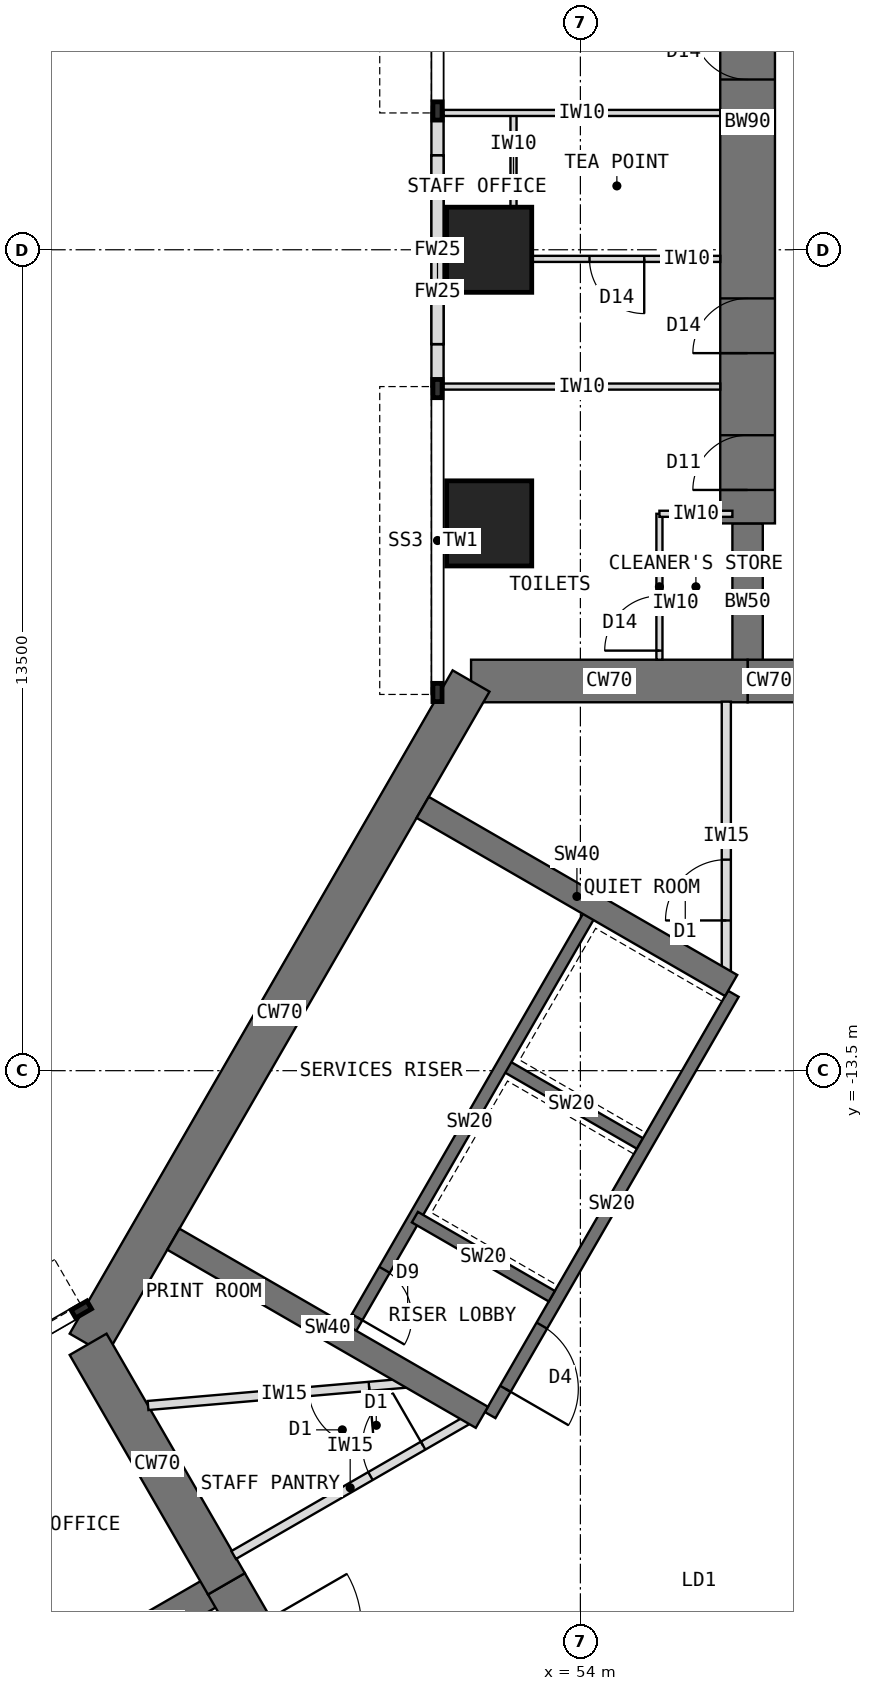
"""IFC4 building model, lengths in metres.
Left out: names, types, materials, properties, quantities, classifications, styles, units other than length and angle.
Written with IfcOpenShell. Run it as: python <this file> out.ifc"""

import sys

from ifc_helpers import new_model, si_unit, direction, frame, frame_2d, origin, origin_2d, place, context, subcontext, project, spatial, rectangle, extrude, element, fill, save


model = new_model("IFC4")
c1 = context("Model", 3, precision=1e-05, world=origin(), true_north=direction((0.0, 1.0)))
c2 = subcontext(c1, "Body", "Model", "MODEL_VIEW")
j1 = project(units=[si_unit("LENGTHUNIT", "METRE"), si_unit("PLANEANGLEUNIT", "RADIAN")], contexts=[c1])
p1 = place(None, origin())
s1 = spatial("IfcSite", under=j1, at=p1, CompositionType="ELEMENT")
p2 = place(p1, origin())
s2 = spatial("IfcBuilding", under=s1, at=p2, CompositionType="ELEMENT")
p3 = place(p2, frame((0.0, 0.0, 88.5)))
s3 = spatial("IfcBuildingStorey", under=s2, at=p3, CompositionType="ELEMENT", Elevation=88.5)
p4 = place(p3, frame((60.25, -7.092, 0.0), z_axis=(0.0, 0.0, 1.0), x_axis=(-1.0, 0.0, 0.0)))
e1 = element("IfcWall", 1, at=p4, inside=s3, PredefinedType="SHEAR", context=c2, shape_type="SweptSolid", body=[
    extrude(rectangle(XDim=3.5, YDim=0.7, at=frame_2d((1.75, 0.0))), origin(), (0.0, 0.0, 1.0), 4.0),
])
p5 = place(p4, frame((0.85, 0.0, 0.0)))
e2 = element("IfcOpeningElement", 2, at=p5, cuts=e1, PredefinedType="OPENING", context=c2, shape_type="SweptSolid", body=[
    extrude(rectangle(XDim=1.8, YDim=2.1, at=frame_2d((0.9, 1.05))), frame((0.0, 0.36, 0.0), z_axis=(0.0, -1.0, 0.0), x_axis=(1.0, 0.0, 0.0)), (0.0, 0.0, 1.0), 0.72),
])
p6 = place(p3, frame((56.75, -7.092, 0.0), z_axis=(0.0, 0.0, 1.0), x_axis=(-1.0, 0.0, 0.0)))
e3 = element("IfcWall", 3, at=p6, inside=s3, PredefinedType="SHEAR", context=c2, shape_type="SweptSolid", body=[
    extrude(rectangle(XDim=4.548, YDim=0.7, at=frame_2d((2.274, 0.0))), origin(), (0.0, 0.0, 1.0), 4.0),
])
p7 = place(p3, frame((52.202, -7.092, 0.0), z_axis=(0.0, 0.0, 1.0), x_axis=(-0.500005998175, -0.866021940709, 0.0)))
e4 = element("IfcWall", 4, at=p7, inside=s3, PredefinedType="SHEAR", context=c2, shape_type="SweptSolid", body=[
    extrude(rectangle(XDim=12.596, YDim=0.7, at=frame_2d((6.298, 0.0))), origin(), (0.0, 0.0, 1.0), 4.0),
])
p8 = place(p3, frame((45.904, -18.0, 0.0), z_axis=(0.0, 0.0, 1.0), x_axis=(0.500024481964, -0.866011268655, 0.0)))
e5 = element("IfcWall", 5, at=p8, inside=s3, PredefinedType="SHEAR", context=c2, shape_type="SweptSolid", body=[
    extrude(rectangle(XDim=4.548, YDim=0.7, at=frame_2d((2.274, 0.0))), origin(), (0.0, 0.0, 1.0), 4.0),
])
p9 = place(p3, frame((48.178, -21.939, 0.0), z_axis=(0.0, 0.0, 1.0), x_axis=(0.500010275428, -0.866019471182, 0.0)))
e6 = element("IfcWall", 6, at=p9, inside=s3, PredefinedType="SHEAR", context=c2, shape_type="SweptSolid", body=[
    extrude(rectangle(XDim=3.5, YDim=0.7, at=frame_2d((1.75, 0.0))), origin(), (0.0, 0.0, 1.0), 4.0),
])
p10 = place(p9, frame((0.85, 0.0, 0.0)))
e7 = element("IfcOpeningElement", 7, at=p10, cuts=e6, PredefinedType="OPENING", context=c2, shape_type="SweptSolid", body=[
    extrude(rectangle(XDim=1.8, YDim=2.1, at=frame_2d((0.9, 1.05))), frame((0.0, 0.36, 0.0), z_axis=(0.0, -1.0, 0.0), x_axis=(1.0, 0.0, 0.0)), (0.0, 0.0, 1.0), 0.72),
])
p11 = place(p3, frame((56.75, -7.092, 0.0), z_axis=(0.0, 0.0, 1.0), x_axis=(0.0, 1.0, 0.0)))
e8 = element("IfcWall", 8, at=p11, inside=s3, PredefinedType="SHEAR", context=c2, shape_type="SweptSolid", body=[
    extrude(rectangle(XDim=2.592, YDim=0.5, at=frame_2d((1.296, 0.0))), origin(), (0.0, 0.0, 1.0), 4.0),
])
p12 = place(p3, frame((56.75, -4.5, 0.0), z_axis=(0.0, 0.0, 1.0), x_axis=(0.0, 1.0, 0.0)))
e9 = element("IfcWall", 9, at=p12, inside=s3, PredefinedType="SHEAR", context=c2, shape_type="SweptSolid", body=[
    extrude(rectangle(XDim=13.2, YDim=0.9, at=frame_2d((6.6, 0.0))), origin(), (0.0, 0.0, 1.0), 4.0),
])
p13 = place(p12, frame((0.55, 0.0, 0.0)))
e10 = element("IfcOpeningElement", 10, at=p13, cuts=e9, PredefinedType="OPENING", context=c2, shape_type="SweptSolid", body=[
    extrude(rectangle(XDim=0.9, YDim=2.1, at=frame_2d((0.45, 1.05))), frame((0.0, 0.46, 0.0), z_axis=(0.0, -1.0, 0.0), x_axis=(1.0, 0.0, 0.0)), (0.0, 0.0, 1.0), 0.92),
])
p14 = place(p12, frame((2.8, 0.0, 0.0)))
e11 = element("IfcOpeningElement", 11, at=p14, cuts=e9, PredefinedType="OPENING", context=c2, shape_type="SweptSolid", body=[
    extrude(rectangle(XDim=0.9, YDim=2.1, at=frame_2d((0.45, 1.05))), frame((0.0, 0.46, 0.0), z_axis=(0.0, -1.0, 0.0), x_axis=(1.0, 0.0, 0.0)), (0.0, 0.0, 1.0), 0.92),
])
p15 = place(p12, frame((7.3, 0.0, 0.0)))
e12 = element("IfcOpeningElement", 12, at=p15, cuts=e9, PredefinedType="OPENING", context=c2, shape_type="SweptSolid", body=[
    extrude(rectangle(XDim=0.9, YDim=2.1, at=frame_2d((0.45, 1.05))), frame((0.0, 0.46, 0.0), z_axis=(0.0, -1.0, 0.0), x_axis=(1.0, 0.0, 0.0)), (0.0, 0.0, 1.0), 0.92),
])
p16 = place(p3, frame((48.178, -21.939, 0.0), z_axis=(0.0, 0.0, 1.0), x_axis=(-0.866072649678, -0.499918158782, 0.0)))
e13 = element("IfcWall", 13, at=p16, inside=s3, PredefinedType="SHEAR", context=c2, shape_type="SweptSolid", body=[
    extrude(rectangle(XDim=2.592, YDim=0.5, at=frame_2d((1.296, 0.0))), origin(), (0.0, 0.0, 1.0), 4.0),
])
for number, where, z_axis, x_axis in (
    (14, (52.5, -4.5, 0.0), (0.0, 0.0, 1.0), (1.0, 0.0, 0.0)),
    (15, (52.5, 0.0, 0.0), (0.0, 0.0, 1.0), (1.0, 0.0, 0.0)),
):
    element("IfcColumn", number, at=place(p3, frame(where, z_axis=z_axis, x_axis=x_axis)), inside=s3, PredefinedType="COLUMN", context=c2, shape_type="SweptSolid", body=[
        extrude(rectangle(XDim=1.4, YDim=1.4, at=origin_2d()), origin(), (0.0, 0.0, 1.0), 4.0),
    ])
for number, where, z_axis, x_axis in (
    (16, (51.65, -2.25, 0.0), (0.0, 0.0, 1.0), (0.0, 1.0, 0.0)),
    (17, (51.65, 1.551, 0.0), (0.0, 0.0, 1.0), (0.0, 1.0, 0.0)),
):
    element("IfcWall", number, at=place(p3, frame(where, z_axis=z_axis, x_axis=x_axis)), inside=s3, PredefinedType="STANDARD", context=c2, shape_type="SweptSolid", body=[
        extrude(rectangle(XDim=0.699, YDim=0.2, at=frame_2d((0.35, 0.0))), origin(), (0.0, 0.0, 1.0), 4.0),
    ])
p17 = place(p3, frame((51.65, -1.551, 0.0), z_axis=(0.0, 0.0, 1.0), x_axis=(0.0, 1.0, 0.0)))
e18 = element("IfcWall", 18, at=p17, inside=s3, PredefinedType="STANDARD", context=c2, shape_type="SweptSolid", body=[
    extrude(rectangle(XDim=3.102, YDim=0.2, at=frame_2d((1.551, 0.0))), origin(), (0.0, 0.0, 1.0), 1.611),
])
p18 = place(p3, frame((51.65, -1.551, 2.821), z_axis=(0.0, 0.0, 1.0), x_axis=(0.0, 1.0, 0.0)))
e19 = element("IfcWall", 19, at=p18, inside=s3, PredefinedType="STANDARD", context=c2, shape_type="SweptSolid", body=[
    extrude(rectangle(XDim=3.102, YDim=0.2, at=frame_2d((1.551, 0.0))), origin(), (0.0, 0.0, 1.0), 1.179),
])
p19 = place(p3, frame((56.516, -12.236, 0.0), z_axis=(0.0, 0.0, 1.0), x_axis=(-0.49999894854, -0.866026010844, 0.0)))
e20 = element("IfcWall", 20, at=p19, inside=s3, PredefinedType="SHEAR", context=c2, shape_type="SweptSolid", body=[
    extrude(rectangle(XDim=8.0, YDim=0.2, at=frame_2d((4.0, 0.0))), origin(), (0.0, 0.0, 1.0), 4.0),
])
p20 = place(p19, frame((6.3, 0.0, 0.0)))
e21 = element("IfcOpeningElement", 21, at=p20, cuts=e20, PredefinedType="OPENING", context=c2, shape_type="SweptSolid", body=[
    extrude(rectangle(XDim=1.2, YDim=2.1, at=frame_2d((0.6, 1.05))), frame((0.0, 0.11, 0.0), z_axis=(0.0, -1.0, 0.0), x_axis=(1.0, 0.0, 0.0)), (0.0, 0.0, 1.0), 0.22),
])
for number, where, z_axis, x_axis in (
    (22, (54.98, -14.697, 0.0), (0.0, 0.0, 1.0), (-0.866, 0.5, 0.0)),
    (23, (53.53, -17.209, 0.0), (0.0, 0.0, 1.0), (-0.866, 0.5, 0.0)),
):
    element("IfcWall", number, at=place(p3, frame(where, z_axis=z_axis, x_axis=x_axis)), inside=s3, PredefinedType="SHEAR", context=c2, shape_type="SweptSolid", body=[
        extrude(rectangle(XDim=2.6, YDim=0.2, at=frame_2d((1.3, 0.0))), origin(), (0.0, 0.0, 1.0), 4.0),
    ])
p21 = place(p3, frame((54.178, -10.886, 0.0), z_axis=(0.0, 0.0, 1.0), x_axis=(-0.49999894854, -0.866026010844, 0.0)))
e24 = element("IfcWall", 24, at=p21, inside=s3, PredefinedType="SHEAR", context=c2, shape_type="SweptSolid", body=[
    extrude(rectangle(XDim=8.0, YDim=0.2, at=frame_2d((4.0, 0.0))), origin(), (0.0, 0.0, 1.0), 4.0),
])
p22 = place(p21, frame((6.8, 0.0, 0.0)))
e25 = element("IfcOpeningElement", 25, at=p22, cuts=e24, PredefinedType="OPENING", context=c2, shape_type="SweptSolid", body=[
    extrude(rectangle(XDim=0.9, YDim=2.1, at=frame_2d((0.45, 1.05))), frame((0.0, 0.11, 0.0), z_axis=(0.0, -1.0, 0.0), x_axis=(1.0, 0.0, 0.0)), (0.0, 0.0, 1.0), 0.22),
])
for number, where, z_axis, x_axis in (
    (26, (52.38, -19.201, 0.0), (0.0, 0.0, 1.0), (-0.866, 0.5, 0.0)),
    (27, (56.48, -12.099, 0.0), (0.0, 0.0, 1.0), (-0.866, 0.5, 0.0)),
):
    element("IfcWall", number, at=place(p3, frame(where, z_axis=z_axis, x_axis=x_axis)), inside=s3, PredefinedType="SHEAR", context=c2, shape_type="SweptSolid", body=[
        extrude(rectangle(XDim=5.858, YDim=0.4, at=frame_2d((2.929, 0.0))), origin(), (0.0, 0.0, 1.0), 4.0),
    ])
for number, where, z_axis, x_axis in (
    (28, (56.3, -2.25, 0.0), (0.0, 0.0, 1.0), (-1.0, 0.0, 0.0)),
    (29, (56.3, 2.25, 0.0), (0.0, 0.0, 1.0), (-1.0, 0.0, 0.0)),
):
    element("IfcWall", number, at=place(p3, frame(where, z_axis=z_axis, x_axis=x_axis)), inside=s3, PredefinedType="PARTITIONING", context=c2, shape_type="SweptSolid", body=[
        extrude(rectangle(XDim=4.55, YDim=0.1, at=frame_2d((2.275, 0.0))), origin(), (0.0, 0.0, 1.0), 3.7),
    ])
p23 = place(p3, frame((52.9, -0.15, 0.0), z_axis=(0.0, 0.0, 1.0), x_axis=(0.0, 1.0, 0.0)))
e30 = element("IfcWall", 30, at=p23, inside=s3, PredefinedType="PARTITIONING", context=c2, shape_type="SweptSolid", body=[
    extrude(rectangle(XDim=2.4, YDim=0.1, at=frame_2d((1.2, 0.0))), origin(), (0.0, 0.0, 1.0), 3.7),
])
p24 = place(p3, frame((56.3, -0.15, 0.0), z_axis=(0.0, 0.0, 1.0), x_axis=(-1.0, 0.0, 0.0)))
e31 = element("IfcWall", 31, at=p24, inside=s3, PredefinedType="PARTITIONING", context=c2, shape_type="SweptSolid", body=[
    extrude(rectangle(XDim=3.4, YDim=0.1, at=frame_2d((1.7, 0.0))), origin(), (0.0, 0.0, 1.0), 3.7),
])
p25 = place(p24, frame((1.25, 0.0, 0.0)))
e32 = element("IfcOpeningElement", 32, at=p25, cuts=e31, PredefinedType="OPENING", context=c2, shape_type="SweptSolid", body=[
    extrude(rectangle(XDim=0.9, YDim=2.1, at=frame_2d((0.45, 1.05))), frame((0.0, 0.06, 0.0), z_axis=(0.0, -1.0, 0.0), x_axis=(1.0, 0.0, 0.0)), (0.0, 0.0, 1.0), 0.12),
])
p26 = place(p3, frame((55.3, -6.742, 0.0), z_axis=(0.0, 0.0, 1.0), x_axis=(0.0, 1.0, 0.0)))
e33 = element("IfcWall", 33, at=p26, inside=s3, PredefinedType="PARTITIONING", context=c2, shape_type="SweptSolid", body=[
    extrude(rectangle(XDim=2.4, YDim=0.1, at=frame_2d((1.2, 0.0))), origin(), (0.0, 0.0, 1.0), 3.7),
])
p27 = place(p26, frame((0.15, 0.0, 0.0)))
e34 = element("IfcOpeningElement", 34, at=p27, cuts=e33, PredefinedType="OPENING", context=c2, shape_type="SweptSolid", body=[
    extrude(rectangle(XDim=0.9, YDim=2.1, at=frame_2d((0.45, 1.05))), frame((0.0, 0.06, 0.0), z_axis=(0.0, -1.0, 0.0), x_axis=(1.0, 0.0, 0.0)), (0.0, 0.0, 1.0), 0.12),
])
p28 = place(p3, frame((56.5, -4.342, 0.0), z_axis=(0.0, 0.0, 1.0), x_axis=(-1.0, 0.0, 0.0)))
e35 = element("IfcWall", 35, at=p28, inside=s3, PredefinedType="PARTITIONING", context=c2, shape_type="SweptSolid", body=[
    extrude(rectangle(XDim=1.2, YDim=0.1, at=frame_2d((0.6, 0.0))), origin(), (0.0, 0.0, 1.0), 3.7),
])
p29 = place(p3, frame((48.298, -21.466, 0.0), z_axis=(0.0, 0.0, 1.0), x_axis=(0.866021148949, 0.500007369519, 0.0)))
e36 = element("IfcWall", 36, at=p29, inside=s3, PredefinedType="PARTITIONING", context=c2, shape_type="SweptSolid", body=[
    extrude(rectangle(XDim=4.426, YDim=0.15, at=frame_2d((2.213, 0.0))), origin(), (0.0, 0.0, 1.0), 3.7),
])
p30 = place(p29, frame((2.598, 0.0, 0.0)))
e37 = element("IfcOpeningElement", 37, at=p30, cuts=e36, PredefinedType="OPENING", context=c2, shape_type="SweptSolid", body=[
    extrude(rectangle(XDim=1.0, YDim=2.1, at=frame_2d((0.5, 1.05))), frame((0.0, 0.085, 0.0), z_axis=(0.0, -1.0, 0.0), x_axis=(1.0, 0.0, 0.0)), (0.0, 0.0, 1.0), 0.17),
])
p31 = place(p3, frame((56.4, -11.857, 0.0), z_axis=(0.0, 0.0, 1.0), x_axis=(0.0, 1.0, 0.0)))
e38 = element("IfcWall", 38, at=p31, inside=s3, PredefinedType="PARTITIONING", context=c2, shape_type="SweptSolid", body=[
    extrude(rectangle(XDim=4.426, YDim=0.15, at=frame_2d((2.213, 0.0))), origin(), (0.0, 0.0, 1.0), 3.7),
])
p32 = place(p31, frame((0.828, 0.0, 0.0)))
e39 = element("IfcOpeningElement", 39, at=p32, cuts=e38, PredefinedType="OPENING", context=c2, shape_type="SweptSolid", body=[
    extrude(rectangle(XDim=1.0, YDim=2.1, at=frame_2d((0.5, 1.05))), frame((0.0, 0.085, 0.0), z_axis=(0.0, -1.0, 0.0), x_axis=(1.0, 0.0, 0.0)), (0.0, 0.0, 1.0), 0.17),
])
p33 = place(p3, frame((51.371, -18.618, 0.0), z_axis=(0.0, 0.0, 1.0), x_axis=(-0.996259708579, -0.086409450071, 0.0)))
e40 = element("IfcWall", 40, at=p33, inside=s3, PredefinedType="PARTITIONING", context=c2, shape_type="SweptSolid", body=[
    extrude(rectangle(XDim=4.498, YDim=0.15, at=frame_2d((2.249, 0.0))), origin(), (0.0, 0.0, 1.0), 3.7),
])
p34 = place(p33, frame((0.849, 0.0, 0.0)))
e41 = element("IfcOpeningElement", 41, at=p34, cuts=e40, PredefinedType="OPENING", context=c2, shape_type="SweptSolid", body=[
    extrude(rectangle(XDim=1.0, YDim=2.1, at=frame_2d((0.5, 1.05))), frame((0.0, 0.085, 0.0), z_axis=(0.0, -1.0, 0.0), x_axis=(1.0, 0.0, 0.0)), (0.0, 0.0, 1.0), 0.17),
])
p35 = place(p20, origin())
e42 = element("IfcDoor", 42, at=p35, inside=s3, OperationType="SINGLE_SWING_RIGHT", PredefinedType="DOOR", context=c2, shape_type="SweptSolid", body=[
    extrude(rectangle(XDim=1.2, YDim=2.1, at=frame_2d((0.6, 1.05))), frame((0.0, 0.025, 0.0), z_axis=(0.0, -1.0, 0.0), x_axis=(1.0, 0.0, 0.0)), (0.0, 0.0, 1.0), 0.05),
])
fill(e21, e42)
p36 = place(p22, origin())
e43 = element("IfcDoor", 43, at=p36, inside=s3, OperationType="SINGLE_SWING_RIGHT", PredefinedType="DOOR", context=c2, shape_type="SweptSolid", body=[
    extrude(rectangle(XDim=0.9, YDim=2.1, at=frame_2d((0.45, 1.05))), frame((0.0, 0.025, 0.0), z_axis=(0.0, -1.0, 0.0), x_axis=(1.0, 0.0, 0.0)), (0.0, 0.0, 1.0), 0.05),
])
fill(e25, e43)
p37 = place(p25, origin())
e44 = element("IfcDoor", 44, at=p37, inside=s3, OperationType="SINGLE_SWING_LEFT", PredefinedType="DOOR", context=c2, shape_type="SweptSolid", body=[
    extrude(rectangle(XDim=0.9, YDim=2.1, at=frame_2d((0.45, 1.05))), frame((0.0, 0.025, 0.0), z_axis=(0.0, -1.0, 0.0), x_axis=(1.0, 0.0, 0.0)), (0.0, 0.0, 1.0), 0.05),
])
fill(e32, e44)
p38 = place(p27, origin())
e45 = element("IfcDoor", 45, at=p38, inside=s3, OperationType="SINGLE_SWING_LEFT", PredefinedType="DOOR", context=c2, shape_type="SweptSolid", body=[
    extrude(rectangle(XDim=0.9, YDim=2.1, at=frame_2d((0.45, 1.05))), frame((0.0, 0.025, 0.0), z_axis=(0.0, -1.0, 0.0), x_axis=(1.0, 0.0, 0.0)), (0.0, 0.0, 1.0), 0.05),
])
fill(e34, e45)
p39 = place(p34, origin())
e46 = element("IfcDoor", 46, at=p39, inside=s3, OperationType="SINGLE_SWING_LEFT", PredefinedType="DOOR", context=c2, shape_type="SweptSolid", body=[
    extrude(rectangle(XDim=1.0, YDim=2.1, at=frame_2d((0.5, 1.05))), frame((0.0, 0.025, 0.0), z_axis=(0.0, -1.0, 0.0), x_axis=(1.0, 0.0, 0.0)), (0.0, 0.0, 1.0), 0.05),
])
fill(e41, e46)
p40 = place(p30, origin())
e47 = element("IfcDoor", 47, at=p40, inside=s3, OperationType="SINGLE_SWING_RIGHT", PredefinedType="DOOR", context=c2, shape_type="SweptSolid", body=[
    extrude(rectangle(XDim=1.0, YDim=2.1, at=frame_2d((0.5, 1.05))), frame((0.0, 0.025, 0.0), z_axis=(0.0, -1.0, 0.0), x_axis=(1.0, 0.0, 0.0)), (0.0, 0.0, 1.0), 0.05),
])
fill(e37, e47)
p41 = place(p32, origin())
e48 = element("IfcDoor", 48, at=p41, inside=s3, OperationType="SINGLE_SWING_LEFT", PredefinedType="DOOR", context=c2, shape_type="SweptSolid", body=[
    extrude(rectangle(XDim=1.0, YDim=2.1, at=frame_2d((0.5, 1.05))), frame((0.0, 0.025, 0.0), z_axis=(0.0, -1.0, 0.0), x_axis=(1.0, 0.0, 0.0)), (0.0, 0.0, 1.0), 0.05),
])
fill(e39, e48)
p42 = place(p13, origin())
e49 = element("IfcDoor", 49, at=p42, inside=s3, OperationType="SINGLE_SWING_LEFT", PredefinedType="DOOR", context=c2, shape_type="SweptSolid", body=[
    extrude(rectangle(XDim=0.82, YDim=2.06, at=frame_2d((0.45, 1.03))), frame((0.0, 0.025, 0.0), z_axis=(0.0, -1.0, 0.0), x_axis=(1.0, 0.0, 0.0)), (0.0, 0.0, 1.0), 0.05),
    extrude(rectangle(XDim=0.04, YDim=2.1, at=frame_2d((0.02, 1.05))), frame((0.0, 0.45, 0.0), z_axis=(0.0, -1.0, 0.0), x_axis=(1.0, 0.0, 0.0)), (0.0, 0.0, 1.0), 0.899),
    extrude(rectangle(XDim=0.04, YDim=2.1, at=frame_2d((0.88, 1.05))), frame((0.0, 0.45, 0.0), z_axis=(0.0, -1.0, 0.0), x_axis=(1.0, 0.0, 0.0)), (0.0, 0.0, 1.0), 0.899),
    extrude(rectangle(XDim=0.82, YDim=0.04, at=frame_2d((0.45, 2.08))), frame((0.0, 0.45, 0.0), z_axis=(0.0, -1.0, 0.0), x_axis=(1.0, 0.0, 0.0)), (0.0, 0.0, 1.0), 0.899),
])
fill(e10, e49)
p43 = place(p14, origin())
e50 = element("IfcDoor", 50, at=p43, inside=s3, OperationType="SINGLE_SWING_LEFT", PredefinedType="DOOR", context=c2, shape_type="SweptSolid", body=[
    extrude(rectangle(XDim=0.82, YDim=2.06, at=frame_2d((0.45, 1.03))), frame((0.0, 0.025, 0.0), z_axis=(0.0, -1.0, 0.0), x_axis=(1.0, 0.0, 0.0)), (0.0, 0.0, 1.0), 0.05),
    extrude(rectangle(XDim=0.04, YDim=2.1, at=frame_2d((0.02, 1.05))), frame((0.0, 0.45, 0.0), z_axis=(0.0, -1.0, 0.0), x_axis=(1.0, 0.0, 0.0)), (0.0, 0.0, 1.0), 0.899),
    extrude(rectangle(XDim=0.04, YDim=2.1, at=frame_2d((0.88, 1.05))), frame((0.0, 0.45, 0.0), z_axis=(0.0, -1.0, 0.0), x_axis=(1.0, 0.0, 0.0)), (0.0, 0.0, 1.0), 0.899),
    extrude(rectangle(XDim=0.82, YDim=0.04, at=frame_2d((0.45, 2.08))), frame((0.0, 0.45, 0.0), z_axis=(0.0, -1.0, 0.0), x_axis=(1.0, 0.0, 0.0)), (0.0, 0.0, 1.0), 0.899),
])
fill(e11, e50)
p44 = place(p15, origin())
e51 = element("IfcDoor", 51, at=p44, inside=s3, OperationType="SINGLE_SWING_RIGHT", PredefinedType="DOOR", context=c2, shape_type="SweptSolid", body=[
    extrude(rectangle(XDim=0.82, YDim=2.06, at=frame_2d((0.45, 1.03))), frame((0.0, 0.025, 0.0), z_axis=(0.0, -1.0, 0.0), x_axis=(1.0, 0.0, 0.0)), (0.0, 0.0, 1.0), 0.05),
    extrude(rectangle(XDim=0.04, YDim=2.1, at=frame_2d((0.02, 1.05))), frame((0.0, 0.45, 0.0), z_axis=(0.0, -1.0, 0.0), x_axis=(1.0, 0.0, 0.0)), (0.0, 0.0, 1.0), 0.899),
    extrude(rectangle(XDim=0.04, YDim=2.1, at=frame_2d((0.88, 1.05))), frame((0.0, 0.45, 0.0), z_axis=(0.0, -1.0, 0.0), x_axis=(1.0, 0.0, 0.0)), (0.0, 0.0, 1.0), 0.899),
    extrude(rectangle(XDim=0.82, YDim=0.04, at=frame_2d((0.45, 2.08))), frame((0.0, 0.45, 0.0), z_axis=(0.0, -1.0, 0.0), x_axis=(1.0, 0.0, 0.0)), (0.0, 0.0, 1.0), 0.899),
])
fill(e12, e51)
save(model, sys.argv[1])
